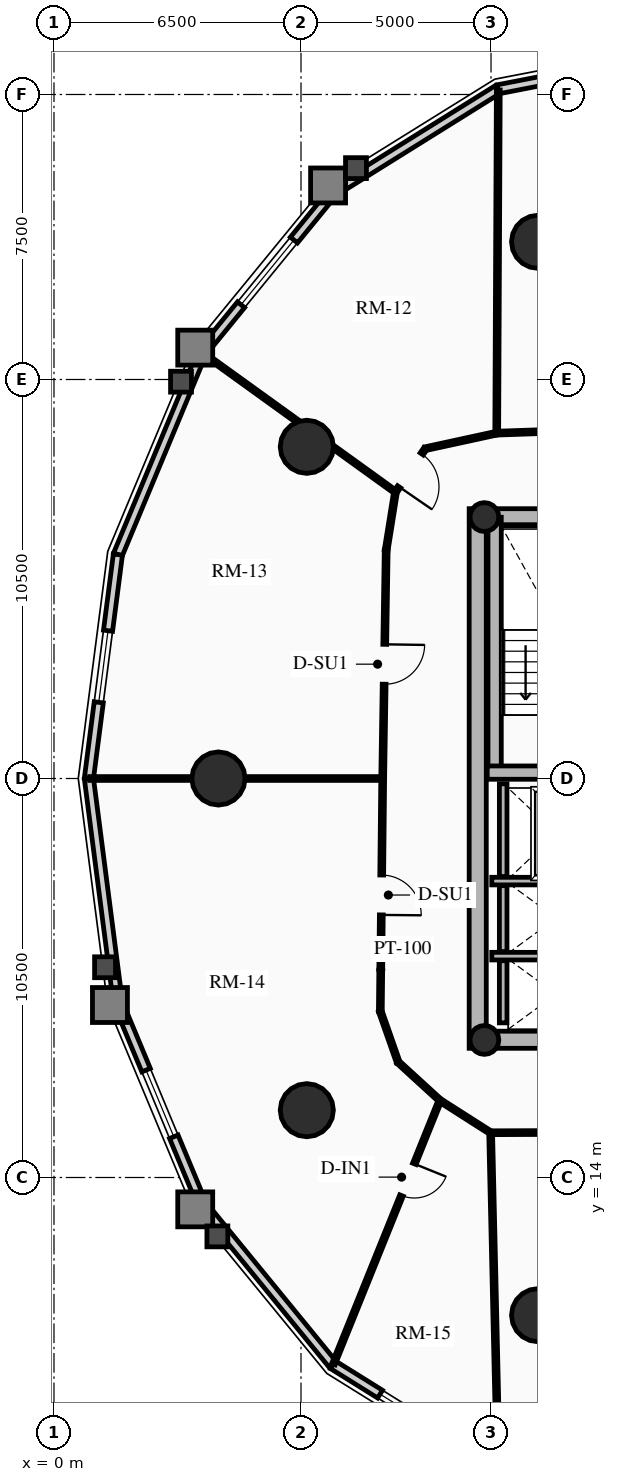
"""IFC4 building model, lengths in metres.
Left out: names, types, materials, properties, quantities, classifications, styles, units other than length and angle.
Written with IfcOpenShell. Run it as: python <this file> out.ifc"""

import sys

from ifc_helpers import new_model, si_unit, direction, frame, frame_2d, origin, origin_2d, place, context, subcontext, project, spatial, rectangle, circle, hollow_circle, extrude, source, transform, mapped, element, fill, save


model = new_model("IFC4")
c1 = context("Model", 3, precision=1e-05, world=origin(), true_north=direction((0.0, 1.0)))
c2 = subcontext(c1, "Body", "Model", "MODEL_VIEW")
j1 = project(units=[si_unit("LENGTHUNIT", "METRE"), si_unit("PLANEANGLEUNIT", "RADIAN")], contexts=[c1])
p1 = place(None, origin())
s1 = spatial("IfcSite", under=j1, at=p1, CompositionType="ELEMENT")
p2 = place(p1, origin())
s2 = spatial("IfcBuilding", under=s1, at=p2, CompositionType="ELEMENT")
p3 = place(p2, frame((0.0, 0.0, 102.16)))
s3 = spatial("IfcBuildingStorey", under=s2, at=p3, CompositionType="ELEMENT", Elevation=102.16)
p4 = place(p3, frame((11.15, 17.4, 0.0), z_axis=(0.0, 0.0, 1.0), x_axis=(0.0, 1.0, 0.0)))
e1 = element("IfcWall", 1, at=p4, inside=s3, PredefinedType="SHEAR", context=c2, shape_type="SweptSolid", body=[
    extrude(rectangle(XDim=14.2, YDim=0.45, at=frame_2d((7.1, 0.0))), origin(), (0.0, 0.0, 1.0), 2.91),
])
p5 = place(p3, frame((11.15, 17.625, 0.0), z_axis=(0.0, 0.0, 1.0), x_axis=(1.0, 0.0, 0.0)))
e2 = element("IfcWall", 2, at=p5, inside=s3, PredefinedType="SHEAR", context=c2, shape_type="SweptSolid", body=[
    extrude(rectangle(XDim=10.7, YDim=0.45, at=frame_2d((5.35, 0.0))), origin(), (0.0, 0.0, 1.0), 2.91),
])
m1 = source(origin(), c2, "Body", "SweptSolid", [
    extrude(rectangle(XDim=1.5, YDim=2.02, at=frame_2d((0.75, 1.01))), frame((0.0, 0.235, 0.0), z_axis=(0.0, -1.0, 0.0), x_axis=(1.0, 0.0, 0.0)), (0.0, 0.0, 1.0), 0.47),
])
p6 = place(p5, frame((5.45, 0.0, 0.0)))
e3 = element("IfcOpeningElement", 3, at=p6, cuts=e2, PredefinedType="OPENING", context=c2, shape_type="MappedRepresentation", body=[
    mapped(m1, transform((0.0, 0.0, 0.0), x_axis=(1.0, 0.0, 0.0), y_axis=(0.0, 1.0, 0.0), z_axis=(0.0, 0.0, 1.0), scale=1.0)),
])
p7 = place(p3, frame((11.15, 31.375, 0.0), z_axis=(0.0, 0.0, 1.0), x_axis=(1.0, 0.0, 0.0)))
e4 = element("IfcWall", 4, at=p7, inside=s3, PredefinedType="SHEAR", context=c2, shape_type="SweptSolid", body=[
    extrude(rectangle(XDim=10.7, YDim=0.45, at=frame_2d((5.35, 0.0))), origin(), (0.0, 0.0, 1.0), 2.91),
])
p8 = place(p7, frame((4.6, 0.0, 0.0)))
e5 = element("IfcOpeningElement", 5, at=p8, cuts=e4, PredefinedType="OPENING", context=c2, shape_type="MappedRepresentation", body=[
    mapped(m1, transform((0.0, 0.0, 0.0), x_axis=(1.0, 0.0, 0.0), y_axis=(0.0, 1.0, 0.0), z_axis=(0.0, 0.0, 1.0), scale=1.0)),
])
p9 = place(p3, frame((11.595, 24.655, 0.0), z_axis=(0.0, 0.0, 1.0), x_axis=(0.0, 1.0, 0.0)))
e6 = element("IfcWall", 6, at=p9, inside=s3, PredefinedType="SHEAR", context=c2, shape_type="SweptSolid", body=[
    extrude(rectangle(XDim=6.72, YDim=0.35, at=frame_2d((3.36, 0.0))), origin(), (0.0, 0.0, 1.0), 2.91),
])
p10 = place(p3, frame((11.4, 24.655, 0.0), z_axis=(0.0, 0.0, 1.0), x_axis=(1.0, 0.0, 0.0)))
e7 = element("IfcWall", 7, at=p10, inside=s3, PredefinedType="SHEAR", context=c2, shape_type="SweptSolid", body=[
    extrude(rectangle(XDim=3.285, YDim=0.35, at=frame_2d((1.643, 0.0))), origin(), (0.0, 0.0, 1.0), 2.91),
])
for number, where, z_axis, x_axis in (
    (8, (11.325, 17.62, 0.0), (0.0, 0.0, 1.0), (1.0, 0.0, 0.0)),
    (9, (11.325, 31.38, 0.0), (0.0, 0.0, 1.0), (1.0, 0.0, 0.0)),
):
    element("IfcColumn", number, at=place(p3, frame(where, z_axis=z_axis, x_axis=x_axis)), inside=s3, PredefinedType="COLUMN", context=c2, shape_type="SweptSolid", body=[
        extrude(hollow_circle(Radius=0.38, WallThickness=0.032, at=origin_2d()), origin(), (0.0, 0.0, 1.0), 2.91),
    ])
for number, where, z_axis, x_axis in (
    (10, (12.739, 38.623, 0.0), (0.0, 0.0, 1.0), (1.0, 0.0, 0.0)),
    (11, (6.653, 33.229, 0.0), (0.0, 0.0, 1.0), (1.0, 0.0, 0.0)),
    (12, (4.328, 24.5, 0.0), (0.0, 0.0, 1.0), (1.0, 0.0, 0.0)),
    (13, (6.653, 15.771, 0.0), (0.0, 0.0, 1.0), (1.0, 0.0, 0.0)),
    (14, (12.739, 10.377, 0.0), (0.0, 0.0, 1.0), (1.0, 0.0, 0.0)),
):
    element("IfcColumn", number, at=place(p3, frame(where, z_axis=z_axis, x_axis=x_axis)), inside=s3, PredefinedType="USERDEFINED", context=c2, shape_type="SweptSolid", body=[
        extrude(circle(Radius=0.7, at=origin_2d()), origin(), (0.0, 0.0, 1.0), 2.91),
    ])
p11 = place(p3, frame((11.685, 42.637, 0.0), z_axis=(0.0, 0.0, 1.0), x_axis=(0.981723785992, 0.190311344954, 0.0)))
e15 = element("IfcWall", 15, at=p11, inside=s3, PredefinedType="SOLIDWALL", context=c2, shape_type="SweptSolid", body=[
    extrude(rectangle(XDim=4.904, YDim=0.24, at=frame_2d((2.452, 0.0))), origin(), (0.0, 0.0, 1.0), 2.179),
])
m2 = source(origin(), c2, "Body", "SweptSolid", [
    extrude(rectangle(XDim=1.9, YDim=1.35, at=frame_2d((0.95, 0.675))), frame((0.0, 0.13, 0.0), z_axis=(0.0, -1.0, 0.0), x_axis=(1.0, 0.0, 0.0)), (0.0, 0.0, 1.0), 0.26),
])
p12 = place(p11, frame((1.502, 0.0, 0.65)))
e16 = element("IfcOpeningElement", 16, at=p12, cuts=e15, PredefinedType="OPENING", context=c2, shape_type="MappedRepresentation", body=[
    mapped(m2, transform((0.0, 0.0, 0.0), x_axis=(1.0, 0.0, 0.0), y_axis=(0.0, 1.0, 0.0), z_axis=(0.0, 0.0, 1.0), scale=1.0)),
])
p13 = place(p3, frame((7.342, 39.928, 0.0), z_axis=(0.0, 0.0, 1.0), x_axis=(0.848520380187, 0.529162701263, 0.0)))
e17 = element("IfcWall", 17, at=p13, inside=s3, PredefinedType="SOLIDWALL", context=c2, shape_type="SweptSolid", body=[
    extrude(rectangle(XDim=5.119, YDim=0.24, at=frame_2d((2.56, 0.0))), origin(), (0.0, 0.0, 1.0), 2.179),
])
p14 = place(p3, frame((3.895, 35.709, 0.0), z_axis=(0.0, 0.0, 1.0), x_axis=(0.632700781152, 0.77439635945, 0.0)))
e18 = element("IfcWall", 18, at=p14, inside=s3, PredefinedType="SOLIDWALL", context=c2, shape_type="SweptSolid", body=[
    extrude(rectangle(XDim=5.448, YDim=0.24, at=frame_2d((2.724, 0.0))), origin(), (0.0, 0.0, 1.0), 2.179),
])
m3 = source(origin(), c2, "Body", "SweptSolid", [
    extrude(rectangle(XDim=2.2, YDim=1.35, at=frame_2d((1.1, 0.675))), frame((0.0, 0.13, 0.0), z_axis=(0.0, -1.0, 0.0), x_axis=(1.0, 0.0, 0.0)), (0.0, 0.0, 1.0), 0.26),
])
p15 = place(p14, frame((1.624, 0.0, 0.65)))
e19 = element("IfcOpeningElement", 19, at=p15, cuts=e18, PredefinedType="OPENING", context=c2, shape_type="MappedRepresentation", body=[
    mapped(m3, transform((0.0, 0.0, 0.0), x_axis=(1.0, 0.0, 0.0), y_axis=(0.0, 1.0, 0.0), z_axis=(0.0, 0.0, 1.0), scale=1.0)),
])
p16 = place(p3, frame((1.682, 30.393, 0.0), z_axis=(0.0, 0.0, 1.0), x_axis=(0.384344417632, 0.923189779317, 0.0)))
e20 = element("IfcWall", 20, at=p16, inside=s3, PredefinedType="SOLIDWALL", context=c2, shape_type="SweptSolid", body=[
    extrude(rectangle(XDim=5.758, YDim=0.24, at=frame_2d((2.879, 0.0))), origin(), (0.0, 0.0, 1.0), 2.179),
])
p17 = place(p3, frame((0.919, 24.5, 0.0), z_axis=(0.0, 0.0, 1.0), x_axis=(0.128351991996, 0.991728675672, 0.0)))
e21 = element("IfcWall", 21, at=p17, inside=s3, PredefinedType="SOLIDWALL", context=c2, shape_type="SweptSolid", body=[
    extrude(rectangle(XDim=5.942, YDim=0.24, at=frame_2d((2.971, 0.0))), origin(), (0.0, 0.0, 1.0), 2.179),
])
p18 = place(p17, frame((2.021, 0.0, 0.65)))
e22 = element("IfcOpeningElement", 22, at=p18, cuts=e21, PredefinedType="OPENING", context=c2, shape_type="MappedRepresentation", body=[
    mapped(m2, transform((0.0, 0.0, 0.0), x_axis=(1.0, 0.0, 0.0), y_axis=(0.0, 1.0, 0.0), z_axis=(0.0, 0.0, 1.0), scale=1.0)),
])
p19 = place(p3, frame((1.682, 18.607, 0.0), z_axis=(0.0, 0.0, 1.0), x_axis=(-0.128351991996, 0.991728675672, 0.0)))
e23 = element("IfcWall", 23, at=p19, inside=s3, PredefinedType="SOLIDWALL", context=c2, shape_type="SweptSolid", body=[
    extrude(rectangle(XDim=5.942, YDim=0.24, at=frame_2d((2.971, 0.0))), origin(), (0.0, 0.0, 1.0), 2.179),
])
p20 = place(p3, frame((3.895, 13.291, 0.0), z_axis=(0.0, 0.0, 1.0), x_axis=(-0.384344417632, 0.923189779317, 0.0)))
e24 = element("IfcWall", 24, at=p20, inside=s3, PredefinedType="SOLIDWALL", context=c2, shape_type="SweptSolid", body=[
    extrude(rectangle(XDim=5.758, YDim=0.24, at=frame_2d((2.879, 0.0))), origin(), (0.0, 0.0, 1.0), 2.179),
])
p21 = place(p20, frame((1.929, 0.0, 0.65)))
e25 = element("IfcOpeningElement", 25, at=p21, cuts=e24, PredefinedType="OPENING", context=c2, shape_type="MappedRepresentation", body=[
    mapped(m2, transform((0.0, 0.0, 0.0), x_axis=(1.0, 0.0, 0.0), y_axis=(0.0, 1.0, 0.0), z_axis=(0.0, 0.0, 1.0), scale=1.0)),
])
p22 = place(p3, frame((7.342, 9.072, 0.0), z_axis=(0.0, 0.0, 1.0), x_axis=(-0.632700781152, 0.77439635945, 0.0)))
e26 = element("IfcWall", 26, at=p22, inside=s3, PredefinedType="SOLIDWALL", context=c2, shape_type="SweptSolid", body=[
    extrude(rectangle(XDim=5.448, YDim=0.24, at=frame_2d((2.724, 0.0))), origin(), (0.0, 0.0, 1.0), 2.179),
])
p23 = place(p3, frame((11.685, 6.363, 0.0), z_axis=(0.0, 0.0, 1.0), x_axis=(-0.848520380187, 0.529162701263, 0.0)))
e27 = element("IfcWall", 27, at=p23, inside=s3, PredefinedType="SOLIDWALL", context=c2, shape_type="SweptSolid", body=[
    extrude(rectangle(XDim=5.119, YDim=0.24, at=frame_2d((2.56, 0.0))), origin(), (0.0, 0.0, 1.0), 2.179),
])
p24 = place(p23, frame((1.459, 0.0, 0.65)))
e28 = element("IfcOpeningElement", 28, at=p24, cuts=e27, PredefinedType="OPENING", context=c2, shape_type="MappedRepresentation", body=[
    mapped(m3, transform((0.0, 0.0, 0.0), x_axis=(1.0, 0.0, 0.0), y_axis=(0.0, 1.0, 0.0), z_axis=(0.0, 0.0, 1.0), scale=1.0)),
])
p25 = place(p3, frame((11.52, 21.8, 0.0), z_axis=(0.0, 0.0, 1.0), x_axis=(1.0, 0.0, 0.0)))
e29 = element("IfcWall", 29, at=p25, inside=s3, PredefinedType="SHEAR", context=c2, shape_type="SweptSolid", body=[
    extrude(rectangle(XDim=2.97, YDim=0.2, at=frame_2d((1.485, 0.0))), origin(), (0.0, 0.0, 1.0), 2.91),
])
p26 = place(p3, frame((11.82, 21.92, 0.0), z_axis=(0.0, 0.0, 1.0), x_axis=(0.0, 1.0, 0.0)))
e30 = element("IfcWall", 30, at=p26, inside=s3, PredefinedType="SHEAR", context=c2, shape_type="SweptSolid", body=[
    extrude(rectangle(XDim=2.44, YDim=0.2, at=frame_2d((1.22, 0.0))), origin(), (0.0, 0.0, 1.0), 2.91),
])
p27 = place(p3, frame((11.52, 19.825, 0.0), z_axis=(0.0, 0.0, 1.0), x_axis=(1.0, 0.0, 0.0)))
e31 = element("IfcWall", 31, at=p27, inside=s3, PredefinedType="SHEAR", context=c2, shape_type="SweptSolid", body=[
    extrude(rectangle(XDim=2.97, YDim=0.2, at=frame_2d((1.485, 0.0))), origin(), (0.0, 0.0, 1.0), 2.91),
])
p28 = place(p3, frame((11.82, 19.945, 0.0), z_axis=(0.0, 0.0, 1.0), x_axis=(0.0, 1.0, 0.0)))
e32 = element("IfcWall", 32, at=p28, inside=s3, PredefinedType="SHEAR", context=c2, shape_type="SweptSolid", body=[
    extrude(rectangle(XDim=1.735, YDim=0.2, at=frame_2d((0.867, 0.0))), origin(), (0.0, 0.0, 1.0), 2.91),
])
p29 = place(p3, frame((11.82, 18.07, 0.0), z_axis=(0.0, 0.0, 1.0), x_axis=(0.0, 1.0, 0.0)))
e33 = element("IfcWall", 33, at=p29, inside=s3, PredefinedType="SHEAR", context=c2, shape_type="SweptSolid", body=[
    extrude(rectangle(XDim=1.635, YDim=0.2, at=frame_2d((0.817, 0.0))), origin(), (0.0, 0.0, 1.0), 2.91),
])
p30 = place(p3, frame((18.133, 33.81, 0.0), z_axis=(0.0, 0.0, 1.0), x_axis=(-0.999415793323, -0.03417706916, 0.0)))
e34 = element("IfcWall", 34, at=p30, inside=s3, PredefinedType="MOVABLE", context=c2, shape_type="SweptSolid", body=[
    extrude(rectangle(XDim=6.486, YDim=0.1, at=frame_2d((3.243, 0.0))), origin(), (0.0, 0.0, 1.0), 2.225),
])
p31 = place(p3, frame((11.65, 33.588, 0.0), z_axis=(0.0, 0.0, 1.0), x_axis=(-0.977141987047, -0.212587716366, 0.0)))
e35 = element("IfcWall", 35, at=p31, inside=s3, PredefinedType="MOVABLE", context=c2, shape_type="SweptSolid", body=[
    extrude(rectangle(XDim=1.924, YDim=0.1, at=frame_2d((0.962, 0.0))), origin(), (0.0, 0.0, 1.0), 2.225),
])
p32 = place(p3, frame((9.771, 33.179, 0.0), z_axis=(0.0, 0.0, 1.0), x_axis=(-0.56664857412, -0.823959582412, 0.0)))
e36 = element("IfcWall", 36, at=p32, inside=s3, PredefinedType="MOVABLE", context=c2, shape_type="SweptSolid", body=[
    extrude(rectangle(XDim=1.384, YDim=0.1, at=frame_2d((0.692, 0.0))), origin(), (0.0, 0.0, 1.0), 2.225),
])
m4 = source(origin(), c2, "Body", "SweptSolid", [
    extrude(rectangle(XDim=1.05, YDim=2.015, at=frame_2d((0.525, 1.007))), frame((0.0, 0.06, 0.0), z_axis=(0.0, -1.0, 0.0), x_axis=(1.0, 0.0, 0.0)), (0.0, 0.0, 1.0), 0.12),
])
p33 = place(p32, frame((0.167, 0.0, 0.0)))
e37 = element("IfcOpeningElement", 37, at=p33, cuts=e36, PredefinedType="OPENING", context=c2, shape_type="MappedRepresentation", body=[
    mapped(m4, transform((0.0, 0.0, 0.0), x_axis=(1.0, 0.0, 0.0), y_axis=(0.0, 1.0, 0.0), z_axis=(0.0, 0.0, 1.0), scale=1.0)),
])
p34 = place(p3, frame((8.986, 32.038, 0.0), z_axis=(0.0, 0.0, 1.0), x_axis=(-0.158224526738, -0.987403159372, 0.0)))
e38 = element("IfcWall", 38, at=p34, inside=s3, PredefinedType="MOVABLE", context=c2, shape_type="SweptSolid", body=[
    extrude(rectangle(XDim=1.546, YDim=0.1, at=frame_2d((0.773, 0.0))), origin(), (0.0, 0.0, 1.0), 2.225),
])
p35 = place(p3, frame((8.742, 30.512, 0.0), z_axis=(0.0, 0.0, 1.0), x_axis=(-0.015267875777, -0.999883439191, 0.0)))
e39 = element("IfcWall", 39, at=p35, inside=s3, PredefinedType="MOVABLE", context=c2, shape_type="SweptSolid", body=[
    extrude(rectangle(XDim=6.012, YDim=0.1, at=frame_2d((3.006, 0.0))), origin(), (0.0, 0.0, 1.0), 2.655),
])
p36 = place(p35, frame((2.481, 0.0, 0.0)))
e40 = element("IfcOpeningElement", 40, at=p36, cuts=e39, PredefinedType="OPENING", context=c2, shape_type="MappedRepresentation", body=[
    mapped(m4, transform((0.0, 0.0, 0.0), x_axis=(1.0, 0.0, 0.0), y_axis=(0.0, 1.0, 0.0), z_axis=(0.0, 0.0, 1.0), scale=1.0)),
])
p37 = place(p3, frame((8.65, 24.5, 0.0), z_axis=(0.0, 0.0, 1.0), x_axis=(-0.010196235655, -0.999948017038, 0.0)))
e41 = element("IfcWall", 41, at=p37, inside=s3, PredefinedType="MOVABLE", context=c2, shape_type="SweptSolid", body=[
    extrude(rectangle(XDim=6.13, YDim=0.1, at=frame_2d((3.065, 0.0))), origin(), (0.0, 0.0, 1.0), 2.225),
])
p38 = place(p37, frame((2.54, 0.0, 0.0)))
e42 = element("IfcOpeningElement", 42, at=p38, cuts=e41, PredefinedType="OPENING", context=c2, shape_type="MappedRepresentation", body=[
    mapped(m4, transform((0.0, 0.0, 0.0), x_axis=(1.0, 0.0, 0.0), y_axis=(0.0, 1.0, 0.0), z_axis=(0.0, 0.0, 1.0), scale=1.0)),
])
p39 = place(p3, frame((8.587, 18.371, 0.0), z_axis=(0.0, 0.0, 1.0), x_axis=(0.331494289155, -0.943457225452, 0.0)))
e43 = element("IfcWall", 43, at=p39, inside=s3, PredefinedType="MOVABLE", context=c2, shape_type="SweptSolid", body=[
    extrude(rectangle(XDim=1.416, YDim=0.1, at=frame_2d((0.708, 0.0))), origin(), (0.0, 0.0, 1.0), 2.225),
])
p40 = place(p3, frame((9.057, 17.034, 0.0), z_axis=(0.0, 0.0, 1.0), x_axis=(0.737874877538, -0.674937526811, 0.0)))
e44 = element("IfcWall", 44, at=p40, inside=s3, PredefinedType="MOVABLE", context=c2, shape_type="SweptSolid", body=[
    extrude(rectangle(XDim=1.49, YDim=0.1, at=frame_2d((0.745, 0.0))), origin(), (0.0, 0.0, 1.0), 2.225),
])
p41 = place(p3, frame((10.156, 16.029, 0.0), z_axis=(0.0, 0.0, 1.0), x_axis=(0.843127549493, -0.537713618282, 0.0)))
e45 = element("IfcWall", 45, at=p41, inside=s3, PredefinedType="MOVABLE", context=c2, shape_type="SweptSolid", body=[
    extrude(rectangle(XDim=1.583, YDim=0.1, at=frame_2d((0.792, 0.0))), origin(), (0.0, 0.0, 1.0), 2.225),
])
p42 = place(p3, frame((11.49, 15.178, 0.0), z_axis=(0.0, 0.0, 1.0), x_axis=(0.99999260582, 0.003845556538, 0.0)))
e46 = element("IfcWall", 46, at=p42, inside=s3, PredefinedType="MOVABLE", context=c2, shape_type="SweptSolid", body=[
    extrude(rectangle(XDim=3.301, YDim=0.1, at=frame_2d((1.651, 0.0))), origin(), (0.0, 0.0, 1.0), 2.225),
])
p43 = place(p3, frame((11.65, 33.588, 0.0), z_axis=(0.0, 0.0, 1.0), x_axis=(0.004542212376, 0.9999896841, 0.0)))
e47 = element("IfcWall", 47, at=p43, inside=s3, PredefinedType="MOVABLE", context=c2, shape_type="SweptSolid", body=[
    extrude(rectangle(XDim=9.03, YDim=0.1, at=frame_2d((4.515, 0.0))), origin(), (0.0, 0.0, 1.0), 2.179),
])
p44 = place(p3, frame((8.986, 32.038, 0.0), z_axis=(0.0, 0.0, 1.0), x_axis=(-0.811184127106, 0.584790827502, 0.0)))
e48 = element("IfcWall", 48, at=p44, inside=s3, PredefinedType="MOVABLE", context=c2, shape_type="SweptSolid", body=[
    extrude(rectangle(XDim=6.257, YDim=0.1, at=frame_2d((3.128, 0.0))), origin(), (0.0, 0.0, 1.0), 2.179),
])
p45 = place(p3, frame((8.65, 24.5, 0.0), z_axis=(0.0, 0.0, 1.0), x_axis=(-1.0, 0.0, 0.0)))
e49 = element("IfcWall", 49, at=p45, inside=s3, PredefinedType="MOVABLE", context=c2, shape_type="SweptSolid", body=[
    extrude(rectangle(XDim=7.711, YDim=0.1, at=frame_2d((3.855, 0.0))), origin(), (0.0, 0.0, 1.0), 2.179),
])
p46 = place(p3, frame((11.49, 15.178, 0.0), z_axis=(0.0, 0.0, 1.0), x_axis=(0.022838019925, -0.999739178409, 0.0)))
e50 = element("IfcWall", 50, at=p46, inside=s3, PredefinedType="MOVABLE", context=c2, shape_type="SweptSolid", body=[
    extrude(rectangle(XDim=8.798, YDim=0.1, at=frame_2d((4.399, 0.0))), origin(), (0.0, 0.0, 1.0), 2.179),
])
p47 = place(p3, frame((10.156, 16.029, 0.0), z_axis=(0.0, 0.0, 1.0), x_axis=(-0.374397256956, -0.9272684045, 0.0)))
e51 = element("IfcWall", 51, at=p47, inside=s3, PredefinedType="MOVABLE", context=c2, shape_type="SweptSolid", body=[
    extrude(rectangle(XDim=7.485, YDim=0.1, at=frame_2d((3.743, 0.0))), origin(), (0.0, 0.0, 1.0), 2.179),
])
m5 = source(origin(), c2, "Body", "SweptSolid", [
    extrude(rectangle(XDim=0.9, YDim=2.005, at=frame_2d((0.45, 1.002))), frame((0.0, 0.06, 0.0), z_axis=(0.0, -1.0, 0.0), x_axis=(1.0, 0.0, 0.0)), (0.0, 0.0, 1.0), 0.12),
])
p48 = place(p47, frame((1.8, 0.0, 0.0)))
e52 = element("IfcOpeningElement", 52, at=p48, cuts=e51, PredefinedType="OPENING", context=c2, shape_type="MappedRepresentation", body=[
    mapped(m5, transform((0.0, 0.0, 0.0), x_axis=(1.0, 0.0, 0.0), y_axis=(0.0, 1.0, 0.0), z_axis=(0.0, 0.0, 1.0), scale=1.0)),
])
m6 = source(origin(), c2, "Body", "SweptSolid", [
    extrude(rectangle(XDim=2.2, YDim=1.35, at=frame_2d((1.1, 0.675))), frame((0.0, 0.03, 0.0), z_axis=(0.0, -1.0, 0.0), x_axis=(1.0, 0.0, 0.0)), (0.0, 0.0, 1.0), 0.06),
])
p49 = place(p15, origin())
e53 = element("IfcWindow", 53, at=p49, inside=s3, PartitioningType="DOUBLE_PANEL_VERTICAL", PredefinedType="WINDOW", context=c2, shape_type="MappedRepresentation", body=[
    mapped(m6, transform((0.0, 0.0, 0.0), x_axis=(1.0, 0.0, 0.0), y_axis=(0.0, 1.0, 0.0), z_axis=(0.0, 0.0, 1.0), scale=1.0)),
])
fill(e19, e53)
m7 = source(origin(), c2, "Body", "SweptSolid", [
    extrude(rectangle(XDim=1.9, YDim=1.35, at=frame_2d((0.95, 0.675))), frame((0.0, 0.03, 0.0), z_axis=(0.0, -1.0, 0.0), x_axis=(1.0, 0.0, 0.0)), (0.0, 0.0, 1.0), 0.06),
])
p50 = place(p18, origin())
e54 = element("IfcWindow", 54, at=p50, inside=s3, PartitioningType="DOUBLE_PANEL_VERTICAL", PredefinedType="WINDOW", context=c2, shape_type="MappedRepresentation", body=[
    mapped(m7, transform((0.0, 0.0, 0.0), x_axis=(1.0, 0.0, 0.0), y_axis=(0.0, 1.0, 0.0), z_axis=(0.0, 0.0, 1.0), scale=1.0)),
])
fill(e22, e54)
p51 = place(p21, origin())
e55 = element("IfcWindow", 55, at=p51, inside=s3, PartitioningType="DOUBLE_PANEL_VERTICAL", PredefinedType="WINDOW", context=c2, shape_type="MappedRepresentation", body=[
    mapped(m7, transform((0.0, 0.0, 0.0), x_axis=(1.0, 0.0, 0.0), y_axis=(0.0, 1.0, 0.0), z_axis=(0.0, 0.0, 1.0), scale=1.0)),
])
fill(e25, e55)
p52 = place(p24, origin())
e56 = element("IfcWindow", 56, at=p52, inside=s3, PartitioningType="DOUBLE_PANEL_VERTICAL", PredefinedType="WINDOW", context=c2, shape_type="MappedRepresentation", body=[
    mapped(m6, transform((0.0, 0.0, 0.0), x_axis=(1.0, 0.0, 0.0), y_axis=(0.0, 1.0, 0.0), z_axis=(0.0, 0.0, 1.0), scale=1.0)),
])
fill(e28, e56)
m8 = source(origin(), c2, "Body", "SweptSolid", [
    extrude(rectangle(XDim=1.05, YDim=2.015, at=frame_2d((0.525, 1.007))), frame((0.0, 0.025, 0.0), z_axis=(0.0, -1.0, 0.0), x_axis=(1.0, 0.0, 0.0)), (0.0, 0.0, 1.0), 0.05),
])
p53 = place(p33, origin())
e57 = element("IfcDoor", 57, at=p53, inside=s3, OperationType="SINGLE_SWING_RIGHT", PredefinedType="DOOR", context=c2, shape_type="MappedRepresentation", body=[
    mapped(m8, transform((0.0, 0.0, 0.0), x_axis=(1.0, 0.0, 0.0), y_axis=(0.0, 1.0, 0.0), z_axis=(0.0, 0.0, 1.0), scale=1.0)),
])
fill(e37, e57)
p54 = place(p36, origin())
e58 = element("IfcDoor", 58, at=p54, inside=s3, OperationType="SINGLE_SWING_LEFT", PredefinedType="DOOR", context=c2, shape_type="MappedRepresentation", body=[
    mapped(m8, transform((0.0, 0.0, 0.0), x_axis=(1.0, 0.0, 0.0), y_axis=(0.0, 1.0, 0.0), z_axis=(0.0, 0.0, 1.0), scale=1.0)),
])
fill(e40, e58)
p55 = place(p38, origin())
e59 = element("IfcDoor", 59, at=p55, inside=s3, OperationType="SINGLE_SWING_RIGHT", PredefinedType="DOOR", context=c2, shape_type="MappedRepresentation", body=[
    mapped(m8, transform((0.0, 0.0, 0.0), x_axis=(1.0, 0.0, 0.0), y_axis=(0.0, 1.0, 0.0), z_axis=(0.0, 0.0, 1.0), scale=1.0)),
])
fill(e42, e59)
m9 = source(origin(), c2, "Body", "SweptSolid", [
    extrude(rectangle(XDim=0.9, YDim=2.005, at=frame_2d((0.45, 1.002))), frame((0.0, 0.025, 0.0), z_axis=(0.0, -1.0, 0.0), x_axis=(1.0, 0.0, 0.0)), (0.0, 0.0, 1.0), 0.05),
])
p56 = place(p48, origin())
e60 = element("IfcDoor", 60, at=p56, inside=s3, OperationType="SINGLE_SWING_LEFT", PredefinedType="DOOR", context=c2, shape_type="MappedRepresentation", body=[
    mapped(m9, transform((0.0, 0.0, 0.0), x_axis=(1.0, 0.0, 0.0), y_axis=(0.0, 1.0, 0.0), z_axis=(0.0, 0.0, 1.0), scale=1.0)),
])
fill(e52, e60)
save(model, sys.argv[1])
